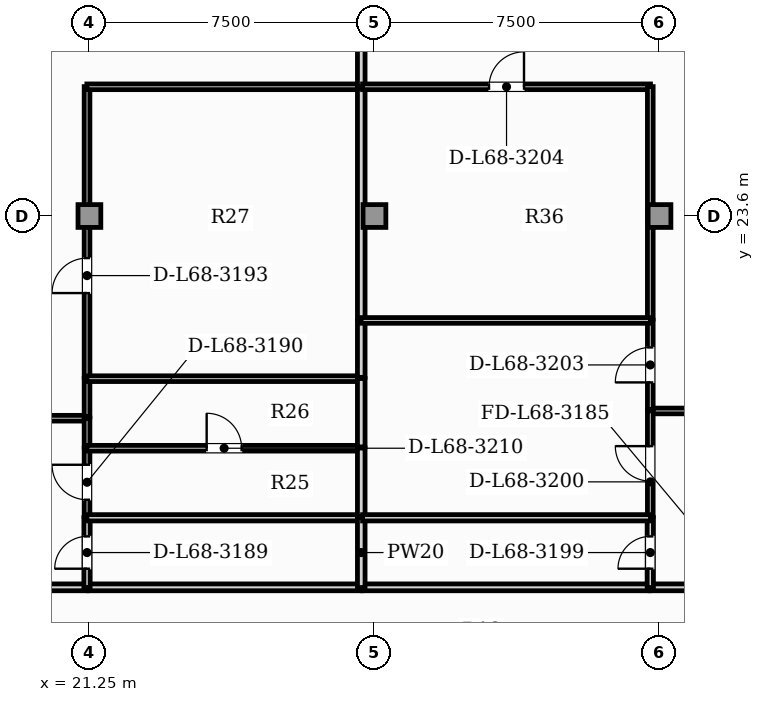
"""IFC4 building model, lengths in metres.
Left out: names, types, materials, properties, quantities, classifications, styles, units other than length and angle.
Written with IfcOpenShell. Run it as: python <this file> out.ifc"""

import sys

from ifc_helpers import new_model, si_unit, direction, frame, frame_2d, origin, origin_2d, place, context, subcontext, project, spatial, rectangle, extrude, element, fill, save


model = new_model("IFC4")
c1 = context("Model", 3, precision=1e-05, world=origin(), true_north=direction((0.0, 1.0)))
c2 = subcontext(c1, "Body", "Model", "MODEL_VIEW")
j1 = project(units=[si_unit("LENGTHUNIT", "METRE"), si_unit("PLANEANGLEUNIT", "RADIAN")], contexts=[c1])
p1 = place(None, origin())
s1 = spatial("IfcSite", under=j1, at=p1, CompositionType="ELEMENT")
p2 = place(p1, origin())
s2 = spatial("IfcBuilding", under=s1, at=p2, CompositionType="ELEMENT")
p3 = place(p2, frame((0.0, 0.0, 276.0)))
s3 = spatial("IfcBuildingStorey", under=s2, at=p3, CompositionType="ELEMENT", Elevation=276.0)
for number, where, z_axis, x_axis in (
    (1, (21.25, 23.6, 0.0), (0.0, 0.0, 1.0), (1.0, 0.0, 0.0)),
    (2, (28.75, 23.6, 0.0), (0.0, 0.0, 1.0), (1.0, 0.0, 0.0)),
    (3, (36.25, 23.6, 0.0), (0.0, 0.0, 1.0), (1.0, 0.0, 0.0)),
):
    element("IfcColumn", number, at=place(p3, frame(where, z_axis=z_axis, x_axis=x_axis)), inside=s3, PredefinedType="COLUMN", context=c2, shape_type="SweptSolid", body=[
        extrude(rectangle(XDim=0.6, YDim=0.6, at=origin_2d()), origin(), (0.0, 0.0, 1.0), 5.05),
    ])
p4 = place(p3, frame((16.202, 13.83, 0.0), z_axis=(0.0, 0.0, 1.0), x_axis=(1.0, 0.0, 0.0)))
e4 = element("IfcWall", 4, at=p4, inside=s3, PredefinedType="PARTITIONING", context=c2, shape_type="SweptSolid", body=[
    extrude(rectangle(XDim=4.99, YDim=0.18, at=frame_2d((2.495, 0.0))), origin(), (0.0, 0.0, 1.0), 4.85),
])
p5 = place(p4, frame((1.995, 0.0, 0.0)))
e5 = element("IfcOpeningElement", 5, at=p5, cuts=e4, PredefinedType="OPENING", context=c2, shape_type="SweptSolid", body=[
    extrude(rectangle(XDim=1.0, YDim=2.15, at=frame_2d((0.5, 1.075))), frame((0.0, 0.1, 0.0), z_axis=(0.0, -1.0, 0.0), x_axis=(1.0, 0.0, 0.0)), (0.0, 0.0, 1.0), 0.2),
])
p6 = place(p3, frame((21.222, 13.83, 0.0), z_axis=(0.0, 0.0, 1.0), x_axis=(1.0, 0.0, 0.0)))
e6 = element("IfcWall", 6, at=p6, inside=s3, PredefinedType="PARTITIONING", context=c2, shape_type="SweptSolid", body=[
    extrude(rectangle(XDim=7.185, YDim=0.18, at=frame_2d((3.593, 0.0))), origin(), (0.0, 0.0, 1.0), 4.85),
])
p7 = place(p3, frame((36.003, 13.83, 0.0), z_axis=(0.0, 0.0, 1.0), x_axis=(1.0, 0.0, 0.0)))
e7 = element("IfcWall", 7, at=p7, inside=s3, PredefinedType="PARTITIONING", context=c2, shape_type="SweptSolid", body=[
    extrude(rectangle(XDim=4.99, YDim=0.18, at=frame_2d((2.495, 0.0))), origin(), (0.0, 0.0, 1.0), 4.85),
])
p8 = place(p7, frame((1.995, 0.0, 0.0)))
e8 = element("IfcOpeningElement", 8, at=p8, cuts=e7, PredefinedType="OPENING", context=c2, shape_type="SweptSolid", body=[
    extrude(rectangle(XDim=1.0, YDim=2.15, at=frame_2d((0.5, 1.075))), frame((0.0, 0.1, 0.0), z_axis=(0.0, -1.0, 0.0), x_axis=(1.0, 0.0, 0.0)), (0.0, 0.0, 1.0), 0.2),
])
p9 = place(p3, frame((28.438, 13.83, 0.0), z_axis=(0.0, 0.0, 1.0), x_axis=(1.0, 0.0, 0.0)))
e9 = element("IfcWall", 9, at=p9, inside=s3, PredefinedType="PARTITIONING", context=c2, shape_type="SweptSolid", body=[
    extrude(rectangle(XDim=7.535, YDim=0.18, at=frame_2d((3.768, 0.0))), origin(), (0.0, 0.0, 1.0), 4.85),
])
p10 = place(p3, frame((16.202, 18.28, 0.0), z_axis=(0.0, 0.0, 1.0), x_axis=(1.0, 0.0, 0.0)))
e10 = element("IfcWall", 10, at=p10, inside=s3, PredefinedType="PARTITIONING", context=c2, shape_type="SweptSolid", body=[
    extrude(rectangle(XDim=4.99, YDim=0.15, at=frame_2d((2.495, 0.0))), origin(), (0.0, 0.0, 1.0), 4.85),
])
p11 = place(p10, frame((2.035, 0.0, 0.0)))
e11 = element("IfcOpeningElement", 11, at=p11, cuts=e10, PredefinedType="OPENING", context=c2, shape_type="SweptSolid", body=[
    extrude(rectangle(XDim=0.92, YDim=2.1, at=frame_2d((0.46, 1.05))), frame((0.0, 0.085, 0.0), z_axis=(0.0, -1.0, 0.0), x_axis=(1.0, 0.0, 0.0)), (0.0, 0.0, 1.0), 0.17),
])
p12 = place(p3, frame((21.188, 13.825, 0.0), z_axis=(0.0, 0.0, 1.0), x_axis=(0.0, 1.0, 0.0)))
e12 = element("IfcWall", 12, at=p12, inside=s3, PredefinedType="PLUMBINGWALL", context=c2, shape_type="SweptSolid", body=[
    extrude(rectangle(XDim=1.84, YDim=0.165, at=frame_2d((0.92, 0.0))), origin(), (0.0, 0.0, 1.0), 4.495),
])
p13 = place(p12, frame((0.495, 0.0, 0.0)))
e13 = element("IfcOpeningElement", 13, at=p13, cuts=e12, PredefinedType="OPENING", context=c2, shape_type="SweptSolid", body=[
    extrude(rectangle(XDim=0.85, YDim=2.1, at=frame_2d((0.425, 1.05))), frame((0.0, 0.093, 0.0), z_axis=(0.0, -1.0, 0.0), x_axis=(1.0, 0.0, 0.0)), (0.0, 0.0, 1.0), 0.185),
])
p14 = place(p3, frame((21.188, 15.695, 0.0), z_axis=(0.0, 0.0, 1.0), x_axis=(0.0, 1.0, 0.0)))
e14 = element("IfcWall", 14, at=p14, inside=s3, PredefinedType="PARTITIONING", context=c2, shape_type="SweptSolid", body=[
    extrude(rectangle(XDim=1.8, YDim=0.15, at=frame_2d((0.9, 0.0))), origin(), (0.0, 0.0, 1.0), 4.495),
])
p15 = place(p14, frame((0.44, 0.0, 0.0)))
e15 = element("IfcOpeningElement", 15, at=p15, cuts=e14, PredefinedType="OPENING", context=c2, shape_type="SweptSolid", body=[
    extrude(rectangle(XDim=0.92, YDim=2.1, at=frame_2d((0.46, 1.05))), frame((0.0, 0.085, 0.0), z_axis=(0.0, -1.0, 0.0), x_axis=(1.0, 0.0, 0.0)), (0.0, 0.0, 1.0), 0.17),
])
p16 = place(p3, frame((21.188, 17.525, 0.0), z_axis=(0.0, 0.0, 1.0), x_axis=(0.0, 1.0, 0.0)))
e16 = element("IfcWall", 16, at=p16, inside=s3, PredefinedType="PARTITIONING", context=c2, shape_type="SweptSolid", body=[
    extrude(rectangle(XDim=0.76, YDim=0.15, at=frame_2d((0.38, 0.0))), origin(), (0.0, 0.0, 1.0), 4.495),
])
p17 = place(p3, frame((21.188, 18.315, 0.0), z_axis=(0.0, 0.0, 1.0), x_axis=(0.0, 1.0, 0.0)))
e17 = element("IfcWall", 17, at=p17, inside=s3, PredefinedType="PARTITIONING", context=c2, shape_type="SweptSolid", body=[
    extrude(rectangle(XDim=1.01, YDim=0.15, at=frame_2d((0.505, 0.0))), origin(), (0.0, 0.0, 1.0), 4.495),
])
p18 = place(p3, frame((21.188, 19.355, 0.0), z_axis=(0.0, 0.0, 1.0), x_axis=(0.0, 1.0, 0.0)))
e18 = element("IfcWall", 18, at=p18, inside=s3, PredefinedType="PARTITIONING", context=c2, shape_type="SweptSolid", body=[
    extrude(rectangle(XDim=7.65, YDim=0.15, at=frame_2d((3.825, 0.0))), origin(), (0.0, 0.0, 1.0), 4.495),
])
p19 = place(p18, frame((2.218, 0.0, 0.0)))
e19 = element("IfcOpeningElement", 19, at=p19, cuts=e18, PredefinedType="OPENING", context=c2, shape_type="SweptSolid", body=[
    extrude(rectangle(XDim=0.92, YDim=2.1, at=frame_2d((0.46, 1.05))), frame((0.0, 0.085, 0.0), z_axis=(0.0, -1.0, 0.0), x_axis=(1.0, 0.0, 0.0)), (0.0, 0.0, 1.0), 0.17),
])
p20 = place(p3, frame((21.183, 27.0, 0.0), z_axis=(0.0, 0.0, 1.0), x_axis=(1.0, 0.0, 0.0)))
e20 = element("IfcWall", 20, at=p20, inside=s3, PredefinedType="PARTITIONING", context=c2, shape_type="SweptSolid", body=[
    extrude(rectangle(XDim=7.225, YDim=0.15, at=frame_2d((3.613, 0.0))), origin(), (0.0, 0.0, 1.0), 4.85),
])
p21 = place(p3, frame((28.403, 26.995, 0.0), z_axis=(0.0, 0.0, 1.0), x_axis=(0.0, 1.0, 0.0)))
e21 = element("IfcWall", 21, at=p21, inside=s3, PredefinedType="PARTITIONING", context=c2, shape_type="SweptSolid", body=[
    extrude(rectangle(XDim=1.51, YDim=0.2, at=frame_2d((0.755, 0.0))), origin(), (0.0, 0.0, 1.0), 4.85),
])
p22 = place(p3, frame((21.183, 15.66, 0.0), z_axis=(0.0, 0.0, 1.0), x_axis=(1.0, 0.0, 0.0)))
e22 = element("IfcWall", 22, at=p22, inside=s3, PredefinedType="PLUMBINGWALL", context=c2, shape_type="SweptSolid", body=[
    extrude(rectangle(XDim=7.225, YDim=0.165, at=frame_2d((3.613, 0.0))), origin(), (0.0, 0.0, 1.0), 4.85),
])
p23 = place(p3, frame((28.403, 13.825, 0.0), z_axis=(0.0, 0.0, 1.0), x_axis=(0.0, 1.0, 0.0)))
e23 = element("IfcWall", 23, at=p23, inside=s3, PredefinedType="PARTITIONING", context=c2, shape_type="SweptSolid", body=[
    extrude(rectangle(XDim=1.84, YDim=0.2, at=frame_2d((0.92, 0.0))), origin(), (0.0, 0.0, 1.0), 4.85),
])
p24 = place(p3, frame((21.183, 17.49, 0.0), z_axis=(0.0, 0.0, 1.0), x_axis=(1.0, 0.0, 0.0)))
e24 = element("IfcWall", 24, at=p24, inside=s3, PredefinedType="PARTITIONING", context=c2, shape_type="SweptSolid", body=[
    extrude(rectangle(XDim=7.225, YDim=0.15, at=frame_2d((3.613, 0.0))), origin(), (0.0, 0.0, 1.0), 4.85),
])
p25 = place(p24, frame((3.153, 0.0, 0.0)))
e25 = element("IfcOpeningElement", 25, at=p25, cuts=e24, PredefinedType="OPENING", context=c2, shape_type="SweptSolid", body=[
    extrude(rectangle(XDim=0.92, YDim=2.1, at=frame_2d((0.46, 1.05))), frame((0.0, 0.085, 0.0), z_axis=(0.0, -1.0, 0.0), x_axis=(1.0, 0.0, 0.0)), (0.0, 0.0, 1.0), 0.17),
])
p26 = place(p3, frame((28.403, 15.695, 0.0), z_axis=(0.0, 0.0, 1.0), x_axis=(0.0, 1.0, 0.0)))
e26 = element("IfcWall", 26, at=p26, inside=s3, PredefinedType="PARTITIONING", context=c2, shape_type="SweptSolid", body=[
    extrude(rectangle(XDim=1.8, YDim=0.2, at=frame_2d((0.9, 0.0))), origin(), (0.0, 0.0, 1.0), 4.85),
])
p27 = place(p3, frame((21.183, 19.32, 0.0), z_axis=(0.0, 0.0, 1.0), x_axis=(1.0, 0.0, 0.0)))
e27 = element("IfcWall", 27, at=p27, inside=s3, PredefinedType="PARTITIONING", context=c2, shape_type="SweptSolid", body=[
    extrude(rectangle(XDim=7.225, YDim=0.15, at=frame_2d((3.613, 0.0))), origin(), (0.0, 0.0, 1.0), 4.85),
])
p28 = place(p3, frame((28.403, 17.525, 0.0), z_axis=(0.0, 0.0, 1.0), x_axis=(0.0, 1.0, 0.0)))
e28 = element("IfcWall", 28, at=p28, inside=s3, PredefinedType="PARTITIONING", context=c2, shape_type="SweptSolid", body=[
    extrude(rectangle(XDim=1.8, YDim=0.2, at=frame_2d((0.9, 0.0))), origin(), (0.0, 0.0, 1.0), 4.85),
])
p29 = place(p3, frame((28.403, 19.355, 0.0), z_axis=(0.0, 0.0, 1.0), x_axis=(0.0, 1.0, 0.0)))
e29 = element("IfcWall", 29, at=p29, inside=s3, PredefinedType="PARTITIONING", context=c2, shape_type="SweptSolid", body=[
    extrude(rectangle(XDim=1.503, YDim=0.2, at=frame_2d((0.751, 0.0))), origin(), (0.0, 0.0, 1.0), 4.85),
])
p30 = place(p3, frame((28.403, 20.888, 0.0), z_axis=(0.0, 0.0, 1.0), x_axis=(0.0, 1.0, 0.0)))
e30 = element("IfcWall", 30, at=p30, inside=s3, PredefinedType="PARTITIONING", context=c2, shape_type="SweptSolid", body=[
    extrude(rectangle(XDim=6.077, YDim=0.2, at=frame_2d((3.039, 0.0))), origin(), (0.0, 0.0, 1.0), 4.85),
])
p31 = place(p3, frame((36.003, 18.471, 0.0), z_axis=(0.0, 0.0, 1.0), x_axis=(1.0, 0.0, 0.0)))
e31 = element("IfcWall", 31, at=p31, inside=s3, PredefinedType="PARTITIONING", context=c2, shape_type="SweptSolid", body=[
    extrude(rectangle(XDim=4.99, YDim=0.15, at=frame_2d((2.495, 0.0))), origin(), (0.0, 0.0, 1.0), 4.85),
])
p32 = place(p31, frame((2.035, 0.0, 0.0)))
e32 = element("IfcOpeningElement", 32, at=p32, cuts=e31, PredefinedType="OPENING", context=c2, shape_type="SweptSolid", body=[
    extrude(rectangle(XDim=0.92, YDim=2.1, at=frame_2d((0.46, 1.05))), frame((0.0, 0.085, 0.0), z_axis=(0.0, -1.0, 0.0), x_axis=(1.0, 0.0, 0.0)), (0.0, 0.0, 1.0), 0.17),
])
p33 = place(p3, frame((36.008, 13.825, 0.0), z_axis=(0.0, 0.0, 1.0), x_axis=(0.0, 1.0, 0.0)))
e33 = element("IfcWall", 33, at=p33, inside=s3, PredefinedType="PLUMBINGWALL", context=c2, shape_type="SweptSolid", body=[
    extrude(rectangle(XDim=1.84, YDim=0.165, at=frame_2d((0.92, 0.0))), origin(), (0.0, 0.0, 1.0), 4.85),
])
p34 = place(p33, frame((0.495, 0.0, 0.0)))
e34 = element("IfcOpeningElement", 34, at=p34, cuts=e33, PredefinedType="OPENING", context=c2, shape_type="SweptSolid", body=[
    extrude(rectangle(XDim=0.85, YDim=2.1, at=frame_2d((0.425, 1.05))), frame((0.0, 0.093, 0.0), z_axis=(0.0, -1.0, 0.0), x_axis=(1.0, 0.0, 0.0)), (0.0, 0.0, 1.0), 0.185),
])
p35 = place(p3, frame((36.008, 15.695, 0.0), z_axis=(0.0, 0.0, 1.0), x_axis=(0.0, 1.0, 0.0)))
e35 = element("IfcWall", 35, at=p35, inside=s3, PredefinedType="PARTITIONING", context=c2, shape_type="SweptSolid", body=[
    extrude(rectangle(XDim=2.781, YDim=0.15, at=frame_2d((1.39, 0.0))), origin(), (0.0, 0.0, 1.0), 4.85),
])
p36 = place(p35, frame((0.93, 0.0, 0.0)))
e36 = element("IfcOpeningElement", 36, at=p36, cuts=e35, PredefinedType="OPENING", context=c2, shape_type="SweptSolid", body=[
    extrude(rectangle(XDim=0.92, YDim=2.1, at=frame_2d((0.46, 1.05))), frame((0.0, 0.085, 0.0), z_axis=(0.0, -1.0, 0.0), x_axis=(1.0, 0.0, 0.0)), (0.0, 0.0, 1.0), 0.17),
])
p37 = place(p3, frame((36.008, 18.506, 0.0), z_axis=(0.0, 0.0, 1.0), x_axis=(0.0, 1.0, 0.0)))
e37 = element("IfcWall", 37, at=p37, inside=s3, PredefinedType="PARTITIONING", context=c2, shape_type="SweptSolid", body=[
    extrude(rectangle(XDim=2.352, YDim=0.15, at=frame_2d((1.176, 0.0))), origin(), (0.0, 0.0, 1.0), 4.85),
])
p38 = place(p37, frame((0.716, 0.0, 0.0)))
e38 = element("IfcOpeningElement", 38, at=p38, cuts=e37, PredefinedType="OPENING", context=c2, shape_type="SweptSolid", body=[
    extrude(rectangle(XDim=0.92, YDim=2.1, at=frame_2d((0.46, 1.05))), frame((0.0, 0.085, 0.0), z_axis=(0.0, -1.0, 0.0), x_axis=(1.0, 0.0, 0.0)), (0.0, 0.0, 1.0), 0.17),
])
p39 = place(p3, frame((28.438, 27.0, 0.0), z_axis=(0.0, 0.0, 1.0), x_axis=(1.0, 0.0, 0.0)))
e39 = element("IfcWall", 39, at=p39, inside=s3, PredefinedType="PARTITIONING", context=c2, shape_type="SweptSolid", body=[
    extrude(rectangle(XDim=7.575, YDim=0.15, at=frame_2d((3.788, 0.0))), origin(), (0.0, 0.0, 1.0), 4.85),
])
p40 = place(p39, frame((3.328, 0.0, 0.0)))
e40 = element("IfcOpeningElement", 40, at=p40, cuts=e39, PredefinedType="OPENING", context=c2, shape_type="SweptSolid", body=[
    extrude(rectangle(XDim=0.92, YDim=2.1, at=frame_2d((0.46, 1.05))), frame((0.0, 0.085, 0.0), z_axis=(0.0, -1.0, 0.0), x_axis=(1.0, 0.0, 0.0)), (0.0, 0.0, 1.0), 0.17),
])
p41 = place(p3, frame((36.008, 20.888, 0.0), z_axis=(0.0, 0.0, 1.0), x_axis=(0.0, 1.0, 0.0)))
e41 = element("IfcWall", 41, at=p41, inside=s3, PredefinedType="PARTITIONING", context=c2, shape_type="SweptSolid", body=[
    extrude(rectangle(XDim=6.117, YDim=0.15, at=frame_2d((3.059, 0.0))), origin(), (0.0, 0.0, 1.0), 4.85),
])
p42 = place(p3, frame((28.438, 15.66, 0.0), z_axis=(0.0, 0.0, 1.0), x_axis=(1.0, 0.0, 0.0)))
e42 = element("IfcWall", 42, at=p42, inside=s3, PredefinedType="PLUMBINGWALL", context=c2, shape_type="SweptSolid", body=[
    extrude(rectangle(XDim=7.575, YDim=0.165, at=frame_2d((3.788, 0.0))), origin(), (0.0, 0.0, 1.0), 4.85),
])
p43 = place(p3, frame((28.398, 20.853, 0.0), z_axis=(0.0, 0.0, 1.0), x_axis=(1.0, 0.0, 0.0)))
e43 = element("IfcWall", 43, at=p43, inside=s3, PredefinedType="PARTITIONING", context=c2, shape_type="SweptSolid", body=[
    extrude(rectangle(XDim=7.615, YDim=0.15, at=frame_2d((3.808, 0.0))), origin(), (0.0, 0.0, 1.0), 4.85),
])
p44 = place(p13, origin())
e44 = element("IfcDoor", 44, at=p44, inside=s3, OperationType="SINGLE_SWING_LEFT", PredefinedType="DOOR", context=c2, shape_type="SweptSolid", body=[
    extrude(rectangle(XDim=0.85, YDim=2.1, at=frame_2d((0.425, 1.05))), frame((0.0, 0.025, 0.0), z_axis=(0.0, -1.0, 0.0), x_axis=(1.0, 0.0, 0.0)), (0.0, 0.0, 1.0), 0.05),
])
fill(e13, e44)
p45 = place(p15, origin())
e45 = element("IfcDoor", 45, at=p45, inside=s3, OperationType="SINGLE_SWING_RIGHT", PredefinedType="DOOR", context=c2, shape_type="SweptSolid", body=[
    extrude(rectangle(XDim=0.92, YDim=2.1, at=frame_2d((0.46, 1.05))), frame((0.0, 0.025, 0.0), z_axis=(0.0, -1.0, 0.0), x_axis=(1.0, 0.0, 0.0)), (0.0, 0.0, 1.0), 0.05),
])
fill(e15, e45)
p46 = place(p19, origin())
e46 = element("IfcDoor", 46, at=p46, inside=s3, OperationType="SINGLE_SWING_LEFT", PredefinedType="DOOR", context=c2, shape_type="SweptSolid", body=[
    extrude(rectangle(XDim=0.92, YDim=2.1, at=frame_2d((0.46, 1.05))), frame((0.0, 0.025, 0.0), z_axis=(0.0, -1.0, 0.0), x_axis=(1.0, 0.0, 0.0)), (0.0, 0.0, 1.0), 0.05),
])
fill(e19, e46)
p47 = place(p34, origin())
e47 = element("IfcDoor", 47, at=p47, inside=s3, OperationType="SINGLE_SWING_LEFT", PredefinedType="DOOR", context=c2, shape_type="SweptSolid", body=[
    extrude(rectangle(XDim=0.85, YDim=2.1, at=frame_2d((0.425, 1.05))), frame((0.0, 0.025, 0.0), z_axis=(0.0, -1.0, 0.0), x_axis=(1.0, 0.0, 0.0)), (0.0, 0.0, 1.0), 0.05),
])
fill(e34, e47)
p48 = place(p36, origin())
e48 = element("IfcDoor", 48, at=p48, inside=s3, OperationType="SINGLE_SWING_RIGHT", PredefinedType="DOOR", context=c2, shape_type="SweptSolid", body=[
    extrude(rectangle(XDim=0.92, YDim=2.1, at=frame_2d((0.46, 1.05))), frame((0.0, 0.025, 0.0), z_axis=(0.0, -1.0, 0.0), x_axis=(1.0, 0.0, 0.0)), (0.0, 0.0, 1.0), 0.05),
])
fill(e36, e48)
p49 = place(p38, origin())
e49 = element("IfcDoor", 49, at=p49, inside=s3, OperationType="SINGLE_SWING_LEFT", PredefinedType="DOOR", context=c2, shape_type="SweptSolid", body=[
    extrude(rectangle(XDim=0.92, YDim=2.1, at=frame_2d((0.46, 1.05))), frame((0.0, 0.025, 0.0), z_axis=(0.0, -1.0, 0.0), x_axis=(1.0, 0.0, 0.0)), (0.0, 0.0, 1.0), 0.05),
])
fill(e38, e49)
p50 = place(p40, origin())
e50 = element("IfcDoor", 50, at=p50, inside=s3, OperationType="SINGLE_SWING_RIGHT", PredefinedType="DOOR", context=c2, shape_type="SweptSolid", body=[
    extrude(rectangle(XDim=0.92, YDim=2.1, at=frame_2d((0.46, 1.05))), frame((0.0, 0.025, 0.0), z_axis=(0.0, -1.0, 0.0), x_axis=(1.0, 0.0, 0.0)), (0.0, 0.0, 1.0), 0.05),
])
fill(e40, e50)
p51 = place(p25, origin())
e51 = element("IfcDoor", 51, at=p51, inside=s3, OperationType="SINGLE_SWING_LEFT", PredefinedType="DOOR", context=c2, shape_type="SweptSolid", body=[
    extrude(rectangle(XDim=0.92, YDim=2.1, at=frame_2d((0.46, 1.05))), frame((0.0, 0.025, 0.0), z_axis=(0.0, -1.0, 0.0), x_axis=(1.0, 0.0, 0.0)), (0.0, 0.0, 1.0), 0.05),
])
fill(e25, e51)
save(model, sys.argv[1])
